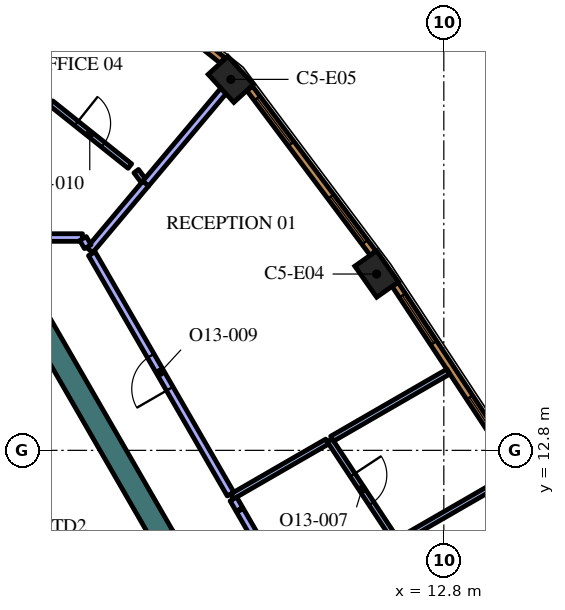
"""IFC4 building model, lengths in metres.
Left out: names, types, materials, properties, quantities, classifications, styles, units other than length and angle.
Written with IfcOpenShell. Run it as: python <this file> out.ifc"""

import sys

from ifc_helpers import new_model, si_unit, direction, frame, frame_2d, origin, origin_2d, place, context, subcontext, project, spatial, rectangle, extrude, element, fill, save


model = new_model("IFC4")
c1 = context("Model", 3, precision=1e-05, world=origin(), true_north=direction((0.0, 1.0)))
c2 = subcontext(c1, "Body", "Model", "MODEL_VIEW")
j1 = project(units=[si_unit("LENGTHUNIT", "METRE"), si_unit("PLANEANGLEUNIT", "RADIAN")], contexts=[c1])
p1 = place(None, origin())
s1 = spatial("IfcSite", under=j1, at=p1, CompositionType="ELEMENT")
p2 = place(p1, origin())
s2 = spatial("IfcBuilding", under=s1, at=p2, CompositionType="ELEMENT")
p3 = place(p2, frame((0.0, 0.0, 296.4)))
s3 = spatial("IfcBuildingStorey", under=s2, at=p3, CompositionType="ELEMENT", Elevation=296.4)
for number, where, z_axis, x_axis in (
    (1, (11.032, 17.44, 0.0), (0.0, 0.0, 1.0), (-0.575, 0.818, 0.0)),
    (2, (7.195, 22.561, 0.0), (0.0, 0.0, 1.0), (-0.676, 0.737, 0.0)),
):
    element("IfcColumn", number, at=place(p3, frame(where, z_axis=z_axis, x_axis=x_axis)), inside=s3, PredefinedType="COLUMN", context=c2, shape_type="SweptSolid", body=[
        extrude(rectangle(XDim=1.0, YDim=0.7, at=origin_2d()), origin(), (0.0, 0.0, 1.0), 4.2),
    ])
p4 = place(p3, frame((1.989, 16.456, 0.0), z_axis=(0.0, 0.0, 1.0), x_axis=(0.499973159588, -0.866040899549, 0.0)))
e3 = element("IfcWall", 3, at=p4, inside=s3, PredefinedType="SOLIDWALL", context=c2, shape_type="SweptSolid", body=[
    extrude(rectangle(XDim=6.828, YDim=0.6, at=frame_2d((3.414, 0.0))), origin(), (0.0, 0.0, 1.0), 4.2),
])
p5 = place(p3, frame((11.564, 10.387, 0.0), z_axis=(0.0, 0.0, 1.0), x_axis=(0.86604641216, 0.499963610661, 0.0)))
e4 = element("IfcWall", 4, at=p5, inside=s3, PredefinedType="PARTITIONING", context=c2, shape_type="SweptSolid", body=[
    extrude(rectangle(XDim=3.096, YDim=0.15, at=frame_2d((1.548, 0.0))), origin(), (0.0, 0.0, 1.0), 3.55),
])
p6 = place(p3, frame((9.795, 13.068, 0.0), z_axis=(0.0, 0.0, 1.0), x_axis=(0.550767347659, -0.834658809786, 0.0)))
e5 = element("IfcWall", 5, at=p6, inside=s3, PredefinedType="PARTITIONING", context=c2, shape_type="SweptSolid", body=[
    extrude(rectangle(XDim=2.999, YDim=0.15, at=frame_2d((1.5, 0.0))), origin(), (0.0, 0.0, 1.0), 3.55),
])
p7 = place(p6, frame((1.099, 0.0, 0.0)))
e6 = element("IfcOpeningElement", 6, at=p7, cuts=e5, PredefinedType="OPENING", context=c2, shape_type="SweptSolid", body=[
    extrude(rectangle(XDim=0.9, YDim=2.1, at=frame_2d((0.45, 1.05))), frame((0.0, 0.085, 0.0), z_axis=(0.0, -1.0, 0.0), x_axis=(1.0, 0.0, 0.0)), (0.0, 0.0, 1.0), 0.17),
])
p8 = place(p3, frame((9.86, 13.106, 0.0), z_axis=(0.0, 0.0, 1.0), x_axis=(0.866022094817, 0.500005731256, 0.0)))
e7 = element("IfcWall", 7, at=p8, inside=s3, PredefinedType="PARTITIONING", context=c2, shape_type="SweptSolid", body=[
    extrude(rectangle(XDim=3.531, YDim=0.15, at=frame_2d((1.766, 0.0))), origin(), (0.0, 0.0, 1.0), 3.55),
])
p9 = place(p3, frame((7.226, 11.585, 0.0), z_axis=(0.0, 0.0, 1.0), x_axis=(0.866021079084, 0.500007490527, 0.0)))
e8 = element("IfcWall", 8, at=p9, inside=s3, PredefinedType="PARTITIONING", context=c2, shape_type="SweptSolid", body=[
    extrude(rectangle(XDim=2.892, YDim=0.15, at=frame_2d((1.446, 0.0))), origin(), (0.0, 0.0, 1.0), 3.55),
])
p10 = place(p3, frame((13.436, 0.829, 0.0), z_axis=(0.0, 0.0, 1.0), x_axis=(-0.49999894854, 0.866026010844, 0.0)))
e9 = element("IfcWall", 9, at=p10, inside=s3, PredefinedType="PARTITIONING", context=c2, shape_type="SweptSolid", body=[
    extrude(rectangle(XDim=12.0, YDim=0.2, at=frame_2d((6.0, 0.0))), origin(), (0.0, 0.0, 1.0), 3.55),
])
p11 = place(p10, frame((5.5, 0.0, 0.0)))
e10 = element("IfcOpeningElement", 10, at=p11, cuts=e9, PredefinedType="OPENING", context=c2, shape_type="SweptSolid", body=[
    extrude(rectangle(XDim=1.0, YDim=2.1, at=frame_2d((0.5, 1.05))), frame((0.0, 0.11, 0.0), z_axis=(0.0, -1.0, 0.0), x_axis=(1.0, 0.0, 0.0)), (0.0, 0.0, 1.0), 0.22),
])
p12 = place(p3, frame((7.421, 11.247, 0.0), z_axis=(0.0, 0.0, 1.0), x_axis=(-0.500303403544, 0.865850162789, 0.0)))
e11 = element("IfcWall", 11, at=p12, inside=s3, PredefinedType="PARTITIONING", context=c2, shape_type="SweptSolid", body=[
    extrude(rectangle(XDim=0.315, YDim=0.2, at=frame_2d((0.158, 0.0))), origin(), (0.0, 0.0, 1.0), 3.55),
])
p13 = place(p3, frame((4.95, 19.814, 0.0), z_axis=(0.0, 0.0, 1.0), x_axis=(0.642981953866, 0.765881326971, 0.0)))
e12 = element("IfcWall", 12, at=p13, inside=s3, PredefinedType="PARTITIONING", context=c2, shape_type="SweptSolid", body=[
    extrude(rectangle(XDim=3.188, YDim=0.2, at=frame_2d((1.594, 0.0))), origin(), (0.0, 0.0, 1.0), 3.55),
])
p14 = place(p3, frame((3.483, 18.067, 0.0), z_axis=(0.0, 0.0, 1.0), x_axis=(0.642896944312, 0.765952687177, 0.0)))
e13 = element("IfcWall", 13, at=p14, inside=s3, PredefinedType="PARTITIONING", context=c2, shape_type="SweptSolid", body=[
    extrude(rectangle(XDim=2.29, YDim=0.2, at=frame_2d((1.145, 0.0))), origin(), (0.0, 0.0, 1.0), 3.55),
])
p15 = place(p3, frame((7.188, 11.65, 0.0), z_axis=(0.0, 0.0, 1.0), x_axis=(-0.499989634868, 0.866031388014, 0.0)))
e14 = element("IfcWall", 14, at=p15, inside=s3, PredefinedType="PARTITIONING", context=c2, shape_type="SweptSolid", body=[
    extrude(rectangle(XDim=7.303, YDim=0.2, at=frame_2d((3.652, 0.0))), origin(), (0.0, 0.0, 1.0), 3.55),
])
p16 = place(p15, frame((3.2, 0.0, 0.0)))
e15 = element("IfcOpeningElement", 15, at=p16, cuts=e14, PredefinedType="OPENING", context=c2, shape_type="SweptSolid", body=[
    extrude(rectangle(XDim=1.0, YDim=2.1, at=frame_2d((0.5, 1.05))), frame((0.0, 0.11, 0.0), z_axis=(0.0, -1.0, 0.0), x_axis=(1.0, 0.0, 0.0)), (0.0, 0.0, 1.0), 0.22),
])
p17 = place(p3, frame((4.891, 19.899, 0.0), z_axis=(0.0, 0.0, 1.0), x_axis=(-0.6, 0.8, 0.0)))
e16 = element("IfcWall", 16, at=p17, inside=s3, PredefinedType="PARTITIONING", context=c2, shape_type="SweptSolid", body=[
    extrude(rectangle(XDim=0.309, YDim=0.15, at=frame_2d((0.154, 0.0))), origin(), (0.0, 0.0, 1.0), 3.55),
])
p18 = place(p3, frame((2.462, 21.937, 0.0), z_axis=(0.0, 0.0, 1.0), x_axis=(0.781630346222, -0.62374193531, 0.0)))
e17 = element("IfcWall", 17, at=p18, inside=s3, PredefinedType="PARTITIONING", context=c2, shape_type="SweptSolid", body=[
    extrude(rectangle(XDim=2.656, YDim=0.15, at=frame_2d((1.328, 0.0))), origin(), (0.0, 0.0, 1.0), 3.55),
])
p19 = place(p18, frame((0.857, 0.0, 0.0)))
e18 = element("IfcOpeningElement", 18, at=p19, cuts=e17, PredefinedType="OPENING", context=c2, shape_type="SweptSolid", body=[
    extrude(rectangle(XDim=0.9, YDim=2.1, at=frame_2d((0.45, 1.05))), frame((0.0, 0.085, 0.0), z_axis=(0.0, -1.0, 0.0), x_axis=(1.0, 0.0, 0.0)), (0.0, 0.0, 1.0), 0.17),
])
p20 = place(p3, frame((3.291, 18.4, 0.0), z_axis=(0.0, 0.0, 1.0), x_axis=(-1.0, 0.0, 0.0)))
e19 = element("IfcWall", 19, at=p20, inside=s3, PredefinedType="PARTITIONING", context=c2, shape_type="SweptSolid", body=[
    extrude(rectangle(XDim=6.582, YDim=0.2, at=frame_2d((3.291, 0.0))), origin(), (0.0, 0.0, 1.0), 3.55),
])
p21 = place(p3, frame((3.43, 18.159, 0.0), z_axis=(0.0, 0.0, 1.0), x_axis=(-0.499949632511, 0.866054481515, 0.0)))
e20 = element("IfcWall", 20, at=p21, inside=s3, PredefinedType="PARTITIONING", context=c2, shape_type="SweptSolid", body=[
    extrude(rectangle(XDim=0.248, YDim=0.2, at=frame_2d((0.124, 0.0))), origin(), (0.0, 0.0, 1.0), 3.55),
])
p22 = place(p3, frame((14.496, 12.653, 0.0), z_axis=(0.0, 0.0, 1.0), x_axis=(-0.550744054781, 0.83467417962, 0.0)))
e21 = element("IfcWall", 21, at=p22, inside=s3, PredefinedType="SOLIDWALL", context=c2, shape_type="SweptSolid", body=[
    extrude(rectangle(XDim=5.406, YDim=0.19, at=frame_2d((2.703, 0.0))), origin(), (0.0, 0.0, 1.0), 3.95),
])
p23 = place(p22, frame((0.346, 0.0, 0.6)))
e22 = element("IfcOpeningElement", 22, at=p23, cuts=e21, PredefinedType="OPENING", context=c2, shape_type="SweptSolid", body=[
    extrude(rectangle(XDim=1.5, YDim=2.85, at=frame_2d((0.75, 1.425))), frame((0.0, 0.105, 0.0), z_axis=(0.0, -1.0, 0.0), x_axis=(1.0, 0.0, 0.0)), (0.0, 0.0, 1.0), 0.21),
])
p24 = place(p22, frame((3.559, 0.0, 0.6)))
e23 = element("IfcOpeningElement", 23, at=p24, cuts=e21, PredefinedType="OPENING", context=c2, shape_type="SweptSolid", body=[
    extrude(rectangle(XDim=1.5, YDim=2.85, at=frame_2d((0.75, 1.425))), frame((0.0, 0.105, 0.0), z_axis=(0.0, -1.0, 0.0), x_axis=(1.0, 0.0, 0.0)), (0.0, 0.0, 1.0), 0.21),
])
p25 = place(p3, frame((10.938, 17.99, 0.0), z_axis=(0.0, 0.0, 1.0), x_axis=(-0.599559865294, 0.800329911929, 0.0)))
e24 = element("IfcWall", 24, at=p25, inside=s3, PredefinedType="SOLIDWALL", context=c2, shape_type="SweptSolid", body=[
    extrude(rectangle(XDim=5.415, YDim=0.19, at=frame_2d((2.708, 0.0))), origin(), (0.0, 0.0, 1.0), 3.95),
])
p26 = place(p25, frame((0.358, 0.0, 0.6)))
e25 = element("IfcOpeningElement", 25, at=p26, cuts=e24, PredefinedType="OPENING", context=c2, shape_type="SweptSolid", body=[
    extrude(rectangle(XDim=1.5, YDim=2.85, at=frame_2d((0.75, 1.425))), frame((0.0, 0.105, 0.0), z_axis=(0.0, -1.0, 0.0), x_axis=(1.0, 0.0, 0.0)), (0.0, 0.0, 1.0), 0.21),
])
p27 = place(p25, frame((3.593, 0.0, 0.6)))
e26 = element("IfcOpeningElement", 26, at=p27, cuts=e24, PredefinedType="OPENING", context=c2, shape_type="SweptSolid", body=[
    extrude(rectangle(XDim=1.5, YDim=2.85, at=frame_2d((0.75, 1.425))), frame((0.0, 0.105, 0.0), z_axis=(0.0, -1.0, 0.0), x_axis=(1.0, 0.0, 0.0)), (0.0, 0.0, 1.0), 0.21),
])
p28 = place(p3, frame((6.977, 23.061, 0.0), z_axis=(0.0, 0.0, 1.0), x_axis=(-0.781626234064, 0.623747088349, 0.0)))
e27 = element("IfcWall", 27, at=p28, inside=s3, PredefinedType="SOLIDWALL", context=c2, shape_type="SweptSolid", body=[
    extrude(rectangle(XDim=3.237, YDim=0.19, at=frame_2d((1.618, 0.0))), origin(), (0.0, 0.0, 1.0), 3.95),
])
p29 = place(p28, frame((1.068, 0.0, 0.6)))
e28 = element("IfcOpeningElement", 28, at=p29, cuts=e27, PredefinedType="OPENING", context=c2, shape_type="SweptSolid", body=[
    extrude(rectangle(XDim=1.1, YDim=2.85, at=frame_2d((0.55, 1.425))), frame((0.0, 0.105, 0.0), z_axis=(0.0, -1.0, 0.0), x_axis=(1.0, 0.0, 0.0)), (0.0, 0.0, 1.0), 0.21),
])
p30 = place(p7, origin())
e29 = element("IfcDoor", 29, at=p30, inside=s3, OperationType="SINGLE_SWING_RIGHT", PredefinedType="DOOR", context=c2, shape_type="SweptSolid", body=[
    extrude(rectangle(XDim=0.9, YDim=2.1, at=frame_2d((0.45, 1.05))), frame((0.0, 0.025, 0.0), z_axis=(0.0, -1.0, 0.0), x_axis=(1.0, 0.0, 0.0)), (0.0, 0.0, 1.0), 0.05),
])
fill(e6, e29)
p31 = place(p16, origin())
e30 = element("IfcDoor", 30, at=p31, inside=s3, OperationType="SINGLE_SWING_RIGHT", PredefinedType="DOOR", context=c2, shape_type="SweptSolid", body=[
    extrude(rectangle(XDim=1.0, YDim=2.1, at=frame_2d((0.5, 1.05))), frame((0.0, 0.025, 0.0), z_axis=(0.0, -1.0, 0.0), x_axis=(1.0, 0.0, 0.0)), (0.0, 0.0, 1.0), 0.05),
])
fill(e15, e30)
p32 = place(p19, origin())
e31 = element("IfcDoor", 31, at=p32, inside=s3, OperationType="SINGLE_SWING_LEFT", PredefinedType="DOOR", context=c2, shape_type="SweptSolid", body=[
    extrude(rectangle(XDim=0.9, YDim=2.1, at=frame_2d((0.45, 1.05))), frame((0.0, 0.025, 0.0), z_axis=(0.0, -1.0, 0.0), x_axis=(1.0, 0.0, 0.0)), (0.0, 0.0, 1.0), 0.05),
])
fill(e18, e31)
p33 = place(p23, origin())
e32 = element("IfcWindow", 32, at=p33, inside=s3, PartitioningType="SINGLE_PANEL", PredefinedType="WINDOW", context=c2, shape_type="SweptSolid", body=[
    extrude(rectangle(XDim=1.5, YDim=2.85, at=frame_2d((0.75, 1.425))), frame((0.0, 0.045, 0.0), z_axis=(0.0, -1.0, 0.0), x_axis=(1.0, 0.0, 0.0)), (0.0, 0.0, 1.0), 0.06),
])
fill(e22, e32)
p34 = place(p24, origin())
e33 = element("IfcWindow", 33, at=p34, inside=s3, PartitioningType="SINGLE_PANEL", PredefinedType="WINDOW", context=c2, shape_type="SweptSolid", body=[
    extrude(rectangle(XDim=1.5, YDim=2.85, at=frame_2d((0.75, 1.425))), frame((0.0, 0.045, 0.0), z_axis=(0.0, -1.0, 0.0), x_axis=(1.0, 0.0, 0.0)), (0.0, 0.0, 1.0), 0.06),
])
fill(e23, e33)
p35 = place(p26, origin())
e34 = element("IfcWindow", 34, at=p35, inside=s3, PartitioningType="SINGLE_PANEL", PredefinedType="WINDOW", context=c2, shape_type="SweptSolid", body=[
    extrude(rectangle(XDim=1.5, YDim=2.85, at=frame_2d((0.75, 1.425))), frame((0.0, 0.045, 0.0), z_axis=(0.0, -1.0, 0.0), x_axis=(1.0, 0.0, 0.0)), (0.0, 0.0, 1.0), 0.06),
])
fill(e25, e34)
p36 = place(p27, origin())
e35 = element("IfcWindow", 35, at=p36, inside=s3, PartitioningType="SINGLE_PANEL", PredefinedType="WINDOW", context=c2, shape_type="SweptSolid", body=[
    extrude(rectangle(XDim=1.5, YDim=2.85, at=frame_2d((0.75, 1.425))), frame((0.0, 0.045, 0.0), z_axis=(0.0, -1.0, 0.0), x_axis=(1.0, 0.0, 0.0)), (0.0, 0.0, 1.0), 0.06),
])
fill(e26, e35)
save(model, sys.argv[1])
